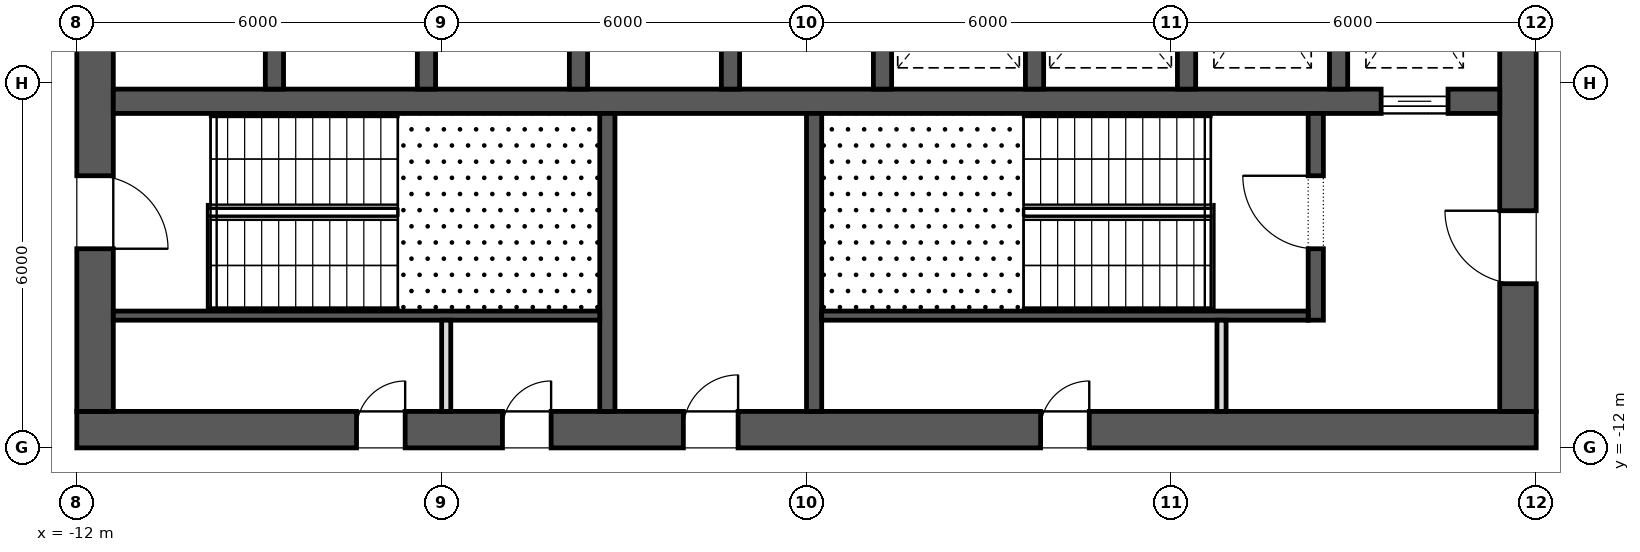
"""IFC4 building model, lengths in metres.
Left out: names, types, materials, properties, quantities, classifications, styles, units other than length and angle.
Written with IfcOpenShell. Run it as: python <this file> out.ifc"""

import sys

from ifc_helpers import new_model, si_unit, direction, frame, frame_2d, origin, place, context, subcontext, project, spatial, rectangle, extrude, element, fill, save


model = new_model("IFC4")
c1 = context("Model", 3, precision=1e-05, world=origin(), true_north=direction((0.0, 1.0)))
c2 = subcontext(c1, "Body", "Model", "MODEL_VIEW")
j1 = project(units=[si_unit("LENGTHUNIT", "METRE"), si_unit("PLANEANGLEUNIT", "RADIAN")], contexts=[c1])
p1 = place(None, origin())
s1 = spatial("IfcSite", under=j1, at=p1, CompositionType="ELEMENT")
p2 = place(p1, origin())
s2 = spatial("IfcBuilding", under=s1, at=p2, CompositionType="ELEMENT")
p3 = place(p2, frame((0.0, 0.0, 48.7)))
s3 = spatial("IfcBuildingStorey", under=s2, at=p3, CompositionType="ELEMENT", Elevation=48.7)
p4 = place(p3, frame((-12.0, -11.7, 0.0), z_axis=(0.0, 0.0, 1.0), x_axis=(1.0, 0.0, 0.0)))
e1 = element("IfcWall", 1, at=p4, inside=s3, PredefinedType="SHEAR", context=c2, shape_type="SweptSolid", body=[
    extrude(rectangle(XDim=24.0, YDim=0.6, at=frame_2d((12.0, 0.0))), origin(), (0.0, 0.0, 1.0), 4.2),
])
p5 = place(p4, frame((9.975, 0.0, 0.0)))
e2 = element("IfcOpeningElement", 2, at=p5, cuts=e1, PredefinedType="OPENING", context=c2, shape_type="SweptSolid", body=[
    extrude(rectangle(XDim=0.9, YDim=2.1, at=frame_2d((0.45, 1.05))), frame((0.0, 0.312, 0.0), z_axis=(0.0, -1.0, 0.0), x_axis=(1.0, 0.0, 0.0)), (0.0, 0.0, 1.0), 0.624),
])
p6 = place(p4, frame((4.6, 0.0, 0.0)))
e3 = element("IfcOpeningElement", 3, at=p6, cuts=e1, PredefinedType="OPENING", context=c2, shape_type="SweptSolid", body=[
    extrude(rectangle(XDim=0.8, YDim=2.1, at=frame_2d((0.4, 1.05))), frame((0.0, 0.312, 0.0), z_axis=(0.0, -1.0, 0.0), x_axis=(1.0, 0.0, 0.0)), (0.0, 0.0, 1.0), 0.624),
])
p7 = place(p4, frame((7.0, 0.0, 0.0)))
e4 = element("IfcOpeningElement", 4, at=p7, cuts=e1, PredefinedType="OPENING", context=c2, shape_type="SweptSolid", body=[
    extrude(rectangle(XDim=0.8, YDim=2.1, at=frame_2d((0.4, 1.05))), frame((0.0, 0.312, 0.0), z_axis=(0.0, -1.0, 0.0), x_axis=(1.0, 0.0, 0.0)), (0.0, 0.0, 1.0), 0.624),
])
p8 = place(p4, frame((15.85, 0.0, 0.0)))
e5 = element("IfcOpeningElement", 5, at=p8, cuts=e1, PredefinedType="OPENING", context=c2, shape_type="SweptSolid", body=[
    extrude(rectangle(XDim=0.8, YDim=2.1, at=frame_2d((0.4, 1.05))), frame((0.0, 0.312, 0.0), z_axis=(0.0, -1.0, 0.0), x_axis=(1.0, 0.0, 0.0)), (0.0, 0.0, 1.0), 0.624),
])
p9 = place(p3, frame((11.7, -11.4, 0.0), z_axis=(0.0, 0.0, 1.0), x_axis=(0.0, 1.0, 0.0)))
e6 = element("IfcWall", 6, at=p9, inside=s3, PredefinedType="SHEAR", context=c2, shape_type="SweptSolid", body=[
    extrude(rectangle(XDim=22.8, YDim=0.6, at=frame_2d((11.4, 0.0))), origin(), (0.0, 0.0, 1.0), 4.2),
])
p10 = place(p9, frame((10.2, 0.0, 0.0)))
e7 = element("IfcOpeningElement", 7, at=p10, cuts=e6, PredefinedType="OPENING", context=c2, shape_type="SweptSolid", body=[
    extrude(rectangle(XDim=2.4, YDim=2.1, at=frame_2d((1.2, 1.05))), frame((0.0, 0.312, 0.0), z_axis=(0.0, -1.0, 0.0), x_axis=(1.0, 0.0, 0.0)), (0.0, 0.0, 1.0), 0.624),
])
p11 = place(p9, frame((19.5, 0.0, 0.0)))
e8 = element("IfcOpeningElement", 8, at=p11, cuts=e6, PredefinedType="OPENING", context=c2, shape_type="SweptSolid", body=[
    extrude(rectangle(XDim=1.2, YDim=2.1, at=frame_2d((0.6, 1.05))), frame((0.0, 0.312, 0.0), z_axis=(0.0, -1.0, 0.0), x_axis=(1.0, 0.0, 0.0)), (0.0, 0.0, 1.0), 0.624),
])
p12 = place(p9, frame((2.1, 0.0, 0.0)))
e9 = element("IfcOpeningElement", 9, at=p12, cuts=e6, PredefinedType="OPENING", context=c2, shape_type="SweptSolid", body=[
    extrude(rectangle(XDim=1.2, YDim=2.1, at=frame_2d((0.6, 1.05))), frame((0.0, 0.312, 0.0), z_axis=(0.0, -1.0, 0.0), x_axis=(1.0, 0.0, 0.0)), (0.0, 0.0, 1.0), 0.624),
])
p13 = place(p3, frame((-11.7, -11.4, 0.0), z_axis=(0.0, 0.0, 1.0), x_axis=(0.0, 1.0, 0.0)))
e10 = element("IfcWall", 10, at=p13, inside=s3, PredefinedType="SHEAR", context=c2, shape_type="SweptSolid", body=[
    extrude(rectangle(XDim=22.8, YDim=0.6, at=frame_2d((11.4, 0.0))), origin(), (0.0, 0.0, 1.0), 4.2),
])
p14 = place(p13, frame((10.2, 0.0, 0.0)))
e11 = element("IfcOpeningElement", 11, at=p14, cuts=e10, PredefinedType="OPENING", context=c2, shape_type="SweptSolid", body=[
    extrude(rectangle(XDim=2.4, YDim=2.1, at=frame_2d((1.2, 1.05))), frame((0.0, 0.312, 0.0), z_axis=(0.0, -1.0, 0.0), x_axis=(1.0, 0.0, 0.0)), (0.0, 0.0, 1.0), 0.624),
])
p15 = place(p13, frame((18.925, 0.0, 0.0)))
e12 = element("IfcOpeningElement", 12, at=p15, cuts=e10, PredefinedType="OPENING", context=c2, shape_type="SweptSolid", body=[
    extrude(rectangle(XDim=1.2, YDim=2.1, at=frame_2d((0.6, 1.05))), frame((0.0, 0.312, 0.0), z_axis=(0.0, -1.0, 0.0), x_axis=(1.0, 0.0, 0.0)), (0.0, 0.0, 1.0), 0.624),
])
p16 = place(p13, frame((2.675, 0.0, 0.0)))
e13 = element("IfcOpeningElement", 13, at=p16, cuts=e10, PredefinedType="OPENING", context=c2, shape_type="SweptSolid", body=[
    extrude(rectangle(XDim=1.2, YDim=2.1, at=frame_2d((0.6, 1.05))), frame((0.0, 0.312, 0.0), z_axis=(0.0, -1.0, 0.0), x_axis=(1.0, 0.0, 0.0)), (0.0, 0.0, 1.0), 0.624),
])
p17 = place(p3, frame((-11.4, -6.3, 0.0), z_axis=(0.0, 0.0, 1.0), x_axis=(1.0, 0.0, 0.0)))
e14 = element("IfcWall", 14, at=p17, inside=s3, PredefinedType="SHEAR", context=c2, shape_type="SweptSolid", body=[
    extrude(rectangle(XDim=22.8, YDim=0.4, at=frame_2d((11.4, 0.0))), origin(), (0.0, 0.0, 1.0), 4.2),
])
p18 = place(p17, frame((20.85, 0.0, 0.0)))
e15 = element("IfcOpeningElement", 15, at=p18, cuts=e14, PredefinedType="OPENING", context=c2, shape_type="SweptSolid", body=[
    extrude(rectangle(XDim=1.1, YDim=2.1, at=frame_2d((0.55, 1.05))), frame((0.0, 0.212, 0.0), z_axis=(0.0, -1.0, 0.0), x_axis=(1.0, 0.0, 0.0)), (0.0, 0.0, 1.0), 0.424),
])
for number, where, z_axis, x_axis in (
    (16, (-8.75, -6.1, 0.0), (0.0, 0.0, 1.0), (0.0, 1.0, 0.0)),
    (17, (-6.25, -6.1, 0.0), (0.0, 0.0, 1.0), (0.0, 1.0, 0.0)),
    (18, (-3.75, -6.1, 0.0), (0.0, 0.0, 1.0), (0.0, 1.0, 0.0)),
    (19, (-1.25, -6.1, 0.0), (0.0, 0.0, 1.0), (0.0, 1.0, 0.0)),
    (20, (1.25, -6.1, 0.0), (0.0, 0.0, 1.0), (0.0, 1.0, 0.0)),
    (21, (3.75, -6.1, 0.0), (0.0, 0.0, 1.0), (0.0, 1.0, 0.0)),
    (22, (6.25, -6.1, 0.0), (0.0, 0.0, 1.0), (0.0, 1.0, 0.0)),
    (23, (8.75, -6.1, 0.0), (0.0, 0.0, 1.0), (0.0, 1.0, 0.0)),
):
    element("IfcWall", number, at=place(p3, frame(where, z_axis=z_axis, x_axis=x_axis)), inside=s3, PredefinedType="SHEAR", context=c2, shape_type="SweptSolid", body=[
        extrude(rectangle(XDim=2.9, YDim=0.3, at=frame_2d((1.45, 0.0))), origin(), (0.0, 0.0, 1.0), 4.2),
    ])
for number, where, z_axis, x_axis in (
    (24, (-3.275, -11.4, 0.0), (0.0, 0.0, 1.0), (0.0, 1.0, 0.0)),
    (25, (0.125, -11.4, 0.0), (0.0, 0.0, 1.0), (0.0, 1.0, 0.0)),
):
    element("IfcWall", number, at=place(p3, frame(where, z_axis=z_axis, x_axis=x_axis)), inside=s3, PredefinedType="SHEAR", context=c2, shape_type="SweptSolid", body=[
        extrude(rectangle(XDim=4.9, YDim=0.25, at=frame_2d((2.45, 0.0))), origin(), (0.0, 0.0, 1.0), 3.9),
    ])
p19 = place(p3, frame((8.375, -9.9, 0.0), z_axis=(0.0, 0.0, 1.0), x_axis=(0.0, 1.0, 0.0)))
e26 = element("IfcWall", 26, at=p19, inside=s3, PredefinedType="SHEAR", context=c2, shape_type="SweptSolid", body=[
    extrude(rectangle(XDim=3.4, YDim=0.25, at=frame_2d((1.7, 0.0))), origin(), (0.0, 0.0, 1.0), 3.9),
])
p20 = place(p19, frame((1.175, 0.0, 0.0)))
e27 = element("IfcOpeningElement", 27, at=p20, cuts=e26, PredefinedType="OPENING", context=c2, shape_type="SweptSolid", body=[
    extrude(rectangle(XDim=1.2, YDim=2.1, at=frame_2d((0.6, 1.05))), frame((0.0, 0.137, 0.0), z_axis=(0.0, -1.0, 0.0), x_axis=(1.0, 0.0, 0.0)), (0.0, 0.0, 1.0), 0.274),
])
for number, where, z_axis, x_axis in (
    (28, (-11.4, -9.825, 0.0), (0.0, 0.0, 1.0), (1.0, 0.0, 0.0)),
    (29, (0.25, -9.825, 0.0), (0.0, 0.0, 1.0), (1.0, 0.0, 0.0)),
):
    element("IfcWall", number, at=place(p3, frame(where, z_axis=z_axis, x_axis=x_axis)), inside=s3, PredefinedType="SHEAR", context=c2, shape_type="SweptSolid", body=[
        extrude(rectangle(XDim=8.0, YDim=0.15, at=frame_2d((4.0, 0.0))), origin(), (0.0, 0.0, 1.0), 3.9),
    ])
for number, where, z_axis, x_axis in (
    (30, (-5.925, -11.4, 0.0), (0.0, 0.0, 1.0), (0.0, 1.0, 0.0)),
    (31, (6.825, -11.4, 0.0), (0.0, 0.0, 1.0), (0.0, 1.0, 0.0)),
):
    element("IfcWall", number, at=place(p3, frame(where, z_axis=z_axis, x_axis=x_axis)), inside=s3, PredefinedType="PARTITIONING", context=c2, shape_type="SweptSolid", body=[
        extrude(rectangle(XDim=1.5, YDim=0.15, at=frame_2d((0.75, 0.0))), origin(), (0.0, 0.0, 1.0), 3.9),
    ])
p21 = place(p18, origin())
e32 = element("IfcDoor", 32, at=p21, inside=s3, OperationType="SLIDING_TO_LEFT", PredefinedType="DOOR", context=c2, shape_type="SweptSolid", body=[
    extrude(rectangle(XDim=1.1, YDim=2.1, at=frame_2d((0.55, 1.05))), frame((0.0, 0.025, 0.0), z_axis=(0.0, -1.0, 0.0), x_axis=(1.0, 0.0, 0.0)), (0.0, 0.0, 1.0), 0.05),
])
fill(e15, e32)
p22 = place(p16, frame((1.2, 0.0, 0.0), z_axis=(0.0, 0.0, 1.0), x_axis=(-1.0, 0.0, 0.0)))
e33 = element("IfcDoor", 33, at=p22, inside=s3, OperationType="SINGLE_SWING_LEFT", PredefinedType="DOOR", context=c2, shape_type="SweptSolid", body=[
    extrude(rectangle(XDim=1.2, YDim=2.1, at=frame_2d((0.6, 1.05))), frame((0.0, 0.025, 0.0), z_axis=(0.0, -1.0, 0.0), x_axis=(1.0, 0.0, 0.0)), (0.0, 0.0, 1.0), 0.05),
])
fill(e13, e33)
p23 = place(p20, origin())
e34 = element("IfcDoor", 34, at=p23, inside=s3, OperationType="SINGLE_SWING_LEFT", PredefinedType="DOOR", context=c2, shape_type="SweptSolid", body=[
    extrude(rectangle(XDim=1.2, YDim=2.1, at=frame_2d((0.6, 1.05))), frame((0.0, 0.025, 0.0), z_axis=(0.0, -1.0, 0.0), x_axis=(1.0, 0.0, 0.0)), (0.0, 0.0, 1.0), 0.05),
])
fill(e27, e34)
p24 = place(p12, origin())
e35 = element("IfcDoor", 35, at=p24, inside=s3, OperationType="SINGLE_SWING_LEFT", PredefinedType="DOOR", context=c2, shape_type="SweptSolid", body=[
    extrude(rectangle(XDim=1.2, YDim=2.1, at=frame_2d((0.6, 1.05))), frame((0.0, 0.025, 0.0), z_axis=(0.0, -1.0, 0.0), x_axis=(1.0, 0.0, 0.0)), (0.0, 0.0, 1.0), 0.05),
])
fill(e9, e35)
p25 = place(p5, origin())
e36 = element("IfcDoor", 36, at=p25, inside=s3, OperationType="SINGLE_SWING_LEFT", PredefinedType="DOOR", context=c2, shape_type="SweptSolid", body=[
    extrude(rectangle(XDim=0.9, YDim=2.1, at=frame_2d((0.45, 1.05))), frame((0.0, 0.025, 0.0), z_axis=(0.0, -1.0, 0.0), x_axis=(1.0, 0.0, 0.0)), (0.0, 0.0, 1.0), 0.05),
])
fill(e2, e36)
p26 = place(p6, origin())
e37 = element("IfcDoor", 37, at=p26, inside=s3, OperationType="SINGLE_SWING_LEFT", PredefinedType="DOOR", context=c2, shape_type="SweptSolid", body=[
    extrude(rectangle(XDim=0.8, YDim=2.1, at=frame_2d((0.4, 1.05))), frame((0.0, 0.025, 0.0), z_axis=(0.0, -1.0, 0.0), x_axis=(1.0, 0.0, 0.0)), (0.0, 0.0, 1.0), 0.05),
])
fill(e3, e37)
p27 = place(p7, origin())
e38 = element("IfcDoor", 38, at=p27, inside=s3, OperationType="SINGLE_SWING_LEFT", PredefinedType="DOOR", context=c2, shape_type="SweptSolid", body=[
    extrude(rectangle(XDim=0.8, YDim=2.1, at=frame_2d((0.4, 1.05))), frame((0.0, 0.025, 0.0), z_axis=(0.0, -1.0, 0.0), x_axis=(1.0, 0.0, 0.0)), (0.0, 0.0, 1.0), 0.05),
])
fill(e4, e38)
p28 = place(p8, origin())
e39 = element("IfcDoor", 39, at=p28, inside=s3, OperationType="SINGLE_SWING_LEFT", PredefinedType="DOOR", context=c2, shape_type="SweptSolid", body=[
    extrude(rectangle(XDim=0.8, YDim=2.1, at=frame_2d((0.4, 1.05))), frame((0.0, 0.025, 0.0), z_axis=(0.0, -1.0, 0.0), x_axis=(1.0, 0.0, 0.0)), (0.0, 0.0, 1.0), 0.05),
])
fill(e5, e39)
save(model, sys.argv[1])
